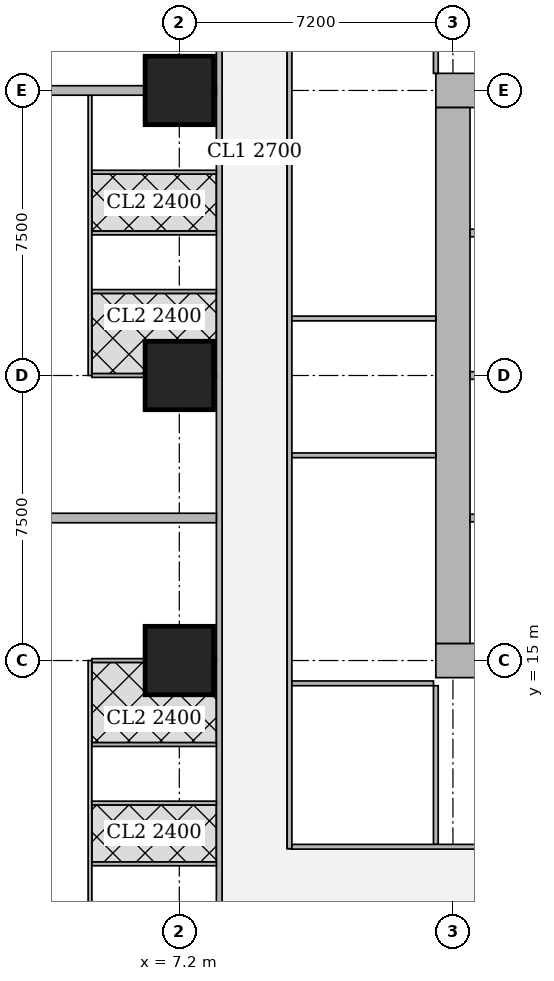
"""IFC4 building model, lengths in metres.
Left out: names, types, materials, properties, quantities, classifications, styles, units other than length and angle.
Written with IfcOpenShell. Run it as: python <this file> out.ifc"""

import sys

from ifc_helpers import new_model, si_unit, direction, frame, frame_2d, origin, origin_2d, place, context, subcontext, project, spatial, rectangle, extrude, element, fill, save


model = new_model("IFC4")
c1 = context("Model", 3, precision=1e-05, world=origin(), true_north=direction((0.0, 1.0)))
c2 = subcontext(c1, "Body", "Model", "MODEL_VIEW")
j1 = project(units=[si_unit("LENGTHUNIT", "METRE"), si_unit("PLANEANGLEUNIT", "RADIAN")], contexts=[c1])
p1 = place(None, origin())
s1 = spatial("IfcSite", under=j1, at=p1, CompositionType="ELEMENT")
p2 = place(p1, origin())
s2 = spatial("IfcBuilding", under=s1, at=p2, CompositionType="ELEMENT")
p3 = place(p2, frame((0.0, 0.0, 31.25)))
s3 = spatial("IfcBuildingStorey", under=s2, at=p3, CompositionType="ELEMENT", Elevation=31.25)
for number, where, z_axis, x_axis in (
    (1, (7.2, 15.0, 0.0), (0.0, 0.0, 1.0), (1.0, 0.0, 0.0)),
    (2, (7.2, 22.5, 0.0), (0.0, 0.0, 1.0), (1.0, 0.0, 0.0)),
    (3, (7.2, 30.0, 0.0), (0.0, 0.0, 1.0), (1.0, 0.0, 0.0)),
):
    element("IfcColumn", number, at=place(p3, frame(where, z_axis=z_axis, x_axis=x_axis)), inside=s3, PredefinedType="COLUMN", context=c2, shape_type="SweptSolid", body=[
        extrude(rectangle(XDim=1.8, YDim=1.8, at=origin_2d()), origin(), (0.0, 0.0, 1.0), 3.75),
    ])
p4 = place(p3, frame((13.95, 15.0, 0.0), z_axis=(0.0, 0.0, 1.0), x_axis=(1.0, 0.0, 0.0)))
e4 = element("IfcWall", 4, at=p4, inside=s3, PredefinedType="SHEAR", context=c2, shape_type="SweptSolid", body=[
    extrude(rectangle(XDim=15.3, YDim=0.9, at=frame_2d((7.65, 0.0))), origin(), (0.0, 0.0, 1.0), 3.75),
])
p5 = place(p4, frame((4.45, 0.0, 0.0)))
e5 = element("IfcOpeningElement", 5, at=p5, cuts=e4, PredefinedType="OPENING", context=c2, shape_type="SweptSolid", body=[
    extrude(rectangle(XDim=1.8, YDim=2.1, at=frame_2d((0.9, 1.05))), frame((0.0, 0.46, 0.0), z_axis=(0.0, -1.0, 0.0), x_axis=(1.0, 0.0, 0.0)), (0.0, 0.0, 1.0), 0.92),
])
p6 = place(p4, frame((10.7, 0.0, 0.0)))
e6 = element("IfcOpeningElement", 6, at=p6, cuts=e4, PredefinedType="OPENING", context=c2, shape_type="SweptSolid", body=[
    extrude(rectangle(XDim=1.1, YDim=2.1, at=frame_2d((0.55, 1.05))), frame((0.0, 0.46, 0.0), z_axis=(0.0, -1.0, 0.0), x_axis=(1.0, 0.0, 0.0)), (0.0, 0.0, 1.0), 0.92),
])
p7 = place(p3, frame((13.95, 30.0, 0.0), z_axis=(0.0, 0.0, 1.0), x_axis=(1.0, 0.0, 0.0)))
e7 = element("IfcWall", 7, at=p7, inside=s3, PredefinedType="SHEAR", context=c2, shape_type="SweptSolid", body=[
    extrude(rectangle(XDim=15.3, YDim=0.9, at=frame_2d((7.65, 0.0))), origin(), (0.0, 0.0, 1.0), 3.75),
])
p8 = place(p7, frame((4.45, 0.0, 0.0)))
e8 = element("IfcOpeningElement", 8, at=p8, cuts=e7, PredefinedType="OPENING", context=c2, shape_type="SweptSolid", body=[
    extrude(rectangle(XDim=1.8, YDim=2.1, at=frame_2d((0.9, 1.05))), frame((0.0, 0.46, 0.0), z_axis=(0.0, -1.0, 0.0), x_axis=(1.0, 0.0, 0.0)), (0.0, 0.0, 1.0), 0.92),
])
p9 = place(p7, frame((10.7, 0.0, 0.0)))
e9 = element("IfcOpeningElement", 9, at=p9, cuts=e7, PredefinedType="OPENING", context=c2, shape_type="SweptSolid", body=[
    extrude(rectangle(XDim=1.1, YDim=2.1, at=frame_2d((0.55, 1.05))), frame((0.0, 0.46, 0.0), z_axis=(0.0, -1.0, 0.0), x_axis=(1.0, 0.0, 0.0)), (0.0, 0.0, 1.0), 0.92),
])
p10 = place(p3, frame((14.4, 15.45, 0.0), z_axis=(0.0, 0.0, 1.0), x_axis=(0.0, 1.0, 0.0)))
e10 = element("IfcWall", 10, at=p10, inside=s3, PredefinedType="SHEAR", context=c2, shape_type="SweptSolid", body=[
    extrude(rectangle(XDim=14.1, YDim=0.9, at=frame_2d((7.05, 0.0))), origin(), (0.0, 0.0, 1.0), 3.75),
])
p11 = place(p3, frame((8.25, 2.426, 0.0), z_axis=(0.0, 0.0, 1.0), x_axis=(0.0, 1.0, 0.0)))
e11 = element("IfcWall", 11, at=p11, inside=s3, PredefinedType="SOLIDWALL", context=c2, shape_type="SweptSolid", body=[
    extrude(rectangle(XDim=40.173, YDim=0.15, at=frame_2d((20.086, 0.0))), origin(), (0.0, 0.0, 1.0), 3.5),
])
p12 = place(p11, frame((14.161, 0.0, 0.0)))
e12 = element("IfcOpeningElement", 12, at=p12, cuts=e11, PredefinedType="OPENING", context=c2, shape_type="SweptSolid", body=[
    extrude(rectangle(XDim=1.0, YDim=2.1, at=frame_2d((0.5, 1.05))), frame((0.0, 0.085, 0.0), z_axis=(0.0, -1.0, 0.0), x_axis=(1.0, 0.0, 0.0)), (0.0, 0.0, 1.0), 0.17),
])
p13 = place(p11, frame((17.487, 0.0, 0.0)))
e13 = element("IfcOpeningElement", 13, at=p13, cuts=e11, PredefinedType="OPENING", context=c2, shape_type="SweptSolid", body=[
    extrude(rectangle(XDim=1.0, YDim=2.1, at=frame_2d((0.5, 1.05))), frame((0.0, 0.085, 0.0), z_axis=(0.0, -1.0, 0.0), x_axis=(1.0, 0.0, 0.0)), (0.0, 0.0, 1.0), 0.17),
])
p14 = place(p11, frame((29.161, 0.0, 0.0)))
e14 = element("IfcOpeningElement", 14, at=p14, cuts=e11, PredefinedType="OPENING", context=c2, shape_type="SweptSolid", body=[
    extrude(rectangle(XDim=1.0, YDim=2.1, at=frame_2d((0.5, 1.05))), frame((0.0, 0.085, 0.0), z_axis=(0.0, -1.0, 0.0), x_axis=(1.0, 0.0, 0.0)), (0.0, 0.0, 1.0), 0.17),
])
p15 = place(p3, frame((4.85, 3.018, 0.0), z_axis=(0.0, 0.0, 1.0), x_axis=(0.0, 1.0, 0.0)))
e15 = element("IfcWall", 15, at=p15, inside=s3, PredefinedType="PARTITIONING", context=c2, shape_type="SweptSolid", body=[
    extrude(rectangle(XDim=11.982, YDim=0.1, at=frame_2d((5.991, 0.0))), origin(), (0.0, 0.0, 1.0), 3.5),
])
p16 = place(p15, frame((10.427, 0.0, 0.0)))
e16 = element("IfcOpeningElement", 16, at=p16, cuts=e15, PredefinedType="OPENING", context=c2, shape_type="SweptSolid", body=[
    extrude(rectangle(XDim=0.9, YDim=2.1, at=frame_2d((0.45, 1.05))), frame((0.0, 0.06, 0.0), z_axis=(0.0, -1.0, 0.0), x_axis=(1.0, 0.0, 0.0)), (0.0, 0.0, 1.0), 0.12),
])
p17 = place(p15, frame((6.982, 0.0, 0.0)))
e17 = element("IfcOpeningElement", 17, at=p17, cuts=e15, PredefinedType="OPENING", context=c2, shape_type="SweptSolid", body=[
    extrude(rectangle(XDim=0.9, YDim=2.1, at=frame_2d((0.45, 1.05))), frame((0.0, 0.06, 0.0), z_axis=(0.0, -1.0, 0.0), x_axis=(1.0, 0.0, 0.0)), (0.0, 0.0, 1.0), 0.12),
])
p18 = place(p15, frame((3.122, 0.0, 0.0)))
e18 = element("IfcOpeningElement", 18, at=p18, cuts=e15, PredefinedType="OPENING", context=c2, shape_type="SweptSolid", body=[
    extrude(rectangle(XDim=0.9, YDim=2.1, at=frame_2d((0.45, 1.05))), frame((0.0, 0.06, 0.0), z_axis=(0.0, -1.0, 0.0), x_axis=(1.0, 0.0, 0.0)), (0.0, 0.0, 1.0), 0.12),
])
p19 = place(p15, frame((8.552, 0.0, 0.0)))
e19 = element("IfcOpeningElement", 19, at=p19, cuts=e15, PredefinedType="OPENING", context=c2, shape_type="SweptSolid", body=[
    extrude(rectangle(XDim=0.9, YDim=2.1, at=frame_2d((0.45, 1.05))), frame((0.0, 0.06, 0.0), z_axis=(0.0, -1.0, 0.0), x_axis=(1.0, 0.0, 0.0)), (0.0, 0.0, 1.0), 0.12),
])
p20 = place(p15, frame((5.107, 0.0, 0.0)))
e20 = element("IfcOpeningElement", 20, at=p20, cuts=e15, PredefinedType="OPENING", context=c2, shape_type="SweptSolid", body=[
    extrude(rectangle(XDim=0.9, YDim=2.1, at=frame_2d((0.45, 1.05))), frame((0.0, 0.06, 0.0), z_axis=(0.0, -1.0, 0.0), x_axis=(1.0, 0.0, 0.0)), (0.0, 0.0, 1.0), 0.12),
])
p21 = place(p15, frame((1.247, 0.0, 0.0)))
e21 = element("IfcOpeningElement", 21, at=p21, cuts=e15, PredefinedType="OPENING", context=c2, shape_type="SweptSolid", body=[
    extrude(rectangle(XDim=0.9, YDim=2.1, at=frame_2d((0.45, 1.05))), frame((0.0, 0.06, 0.0), z_axis=(0.0, -1.0, 0.0), x_axis=(1.0, 0.0, 0.0)), (0.0, 0.0, 1.0), 0.12),
])
p22 = place(p3, frame((4.9, 11.25, 0.0), z_axis=(0.0, 0.0, 1.0), x_axis=(1.0, 0.0, 0.0)))
e22 = element("IfcWall", 22, at=p22, inside=s3, PredefinedType="PARTITIONING", context=c2, shape_type="SweptSolid", body=[
    extrude(rectangle(XDim=3.275, YDim=0.1, at=frame_2d((1.638, 0.0))), origin(), (0.0, 0.0, 1.0), 3.5),
])
p23 = place(p3, frame((4.9, 15.0, 0.0), z_axis=(0.0, 0.0, 1.0), x_axis=(1.0, 0.0, 0.0)))
e23 = element("IfcWall", 23, at=p23, inside=s3, PredefinedType="PARTITIONING", context=c2, shape_type="SweptSolid", body=[
    extrude(rectangle(XDim=1.399, YDim=0.1, at=frame_2d((0.7, 0.0))), origin(), (0.0, 0.0, 1.0), 3.5),
])
p24 = place(p3, frame((8.101, 15.0, 0.0), z_axis=(0.0, 0.0, 1.0), x_axis=(1.0, 0.0, 0.0)))
e24 = element("IfcWall", 24, at=p24, inside=s3, PredefinedType="PARTITIONING", context=c2, shape_type="SweptSolid", body=[
    extrude(rectangle(XDim=0.074, YDim=0.1, at=frame_2d((0.037, 0.0))), origin(), (0.0, 0.0, 1.0), 3.5),
])
for number, where, z_axis, x_axis in (
    (25, (4.9, 12.79, 0.0), (0.0, 0.0, 1.0), (1.0, 0.0, 0.0)),
    (26, (4.9, 9.65, 0.0), (0.0, 0.0, 1.0), (1.0, 0.0, 0.0)),
):
    element("IfcWall", number, at=place(p3, frame(where, z_axis=z_axis, x_axis=x_axis)), inside=s3, PredefinedType="PARTITIONING", context=c2, shape_type="SweptSolid", body=[
        extrude(rectangle(XDim=3.275, YDim=0.1, at=frame_2d((1.638, 0.0))), origin(), (0.0, 0.0, 1.0), 3.5),
    ])
p25 = place(p3, frame((4.85, 22.5, 0.0), z_axis=(0.0, 0.0, 1.0), x_axis=(0.0, 1.0, 0.0)))
e27 = element("IfcWall", 27, at=p25, inside=s3, PredefinedType="PARTITIONING", context=c2, shape_type="SweptSolid", body=[
    extrude(rectangle(XDim=7.375, YDim=0.1, at=frame_2d((3.688, 0.0))), origin(), (0.0, 0.0, 1.0), 3.5),
])
p26 = place(p25, frame((0.655, 0.0, 0.0)))
e28 = element("IfcOpeningElement", 28, at=p26, cuts=e27, PredefinedType="OPENING", context=c2, shape_type="SweptSolid", body=[
    extrude(rectangle(XDim=0.9, YDim=2.1, at=frame_2d((0.45, 1.05))), frame((0.0, 0.06, 0.0), z_axis=(0.0, -1.0, 0.0), x_axis=(1.0, 0.0, 0.0)), (0.0, 0.0, 1.0), 0.12),
])
p27 = place(p25, frame((4.1, 0.0, 0.0)))
e29 = element("IfcOpeningElement", 29, at=p27, cuts=e27, PredefinedType="OPENING", context=c2, shape_type="SweptSolid", body=[
    extrude(rectangle(XDim=0.9, YDim=2.1, at=frame_2d((0.45, 1.05))), frame((0.0, 0.06, 0.0), z_axis=(0.0, -1.0, 0.0), x_axis=(1.0, 0.0, 0.0)), (0.0, 0.0, 1.0), 0.12),
])
p28 = place(p25, frame((2.53, 0.0, 0.0)))
e30 = element("IfcOpeningElement", 30, at=p28, cuts=e27, PredefinedType="OPENING", context=c2, shape_type="SweptSolid", body=[
    extrude(rectangle(XDim=0.9, YDim=2.1, at=frame_2d((0.45, 1.05))), frame((0.0, 0.06, 0.0), z_axis=(0.0, -1.0, 0.0), x_axis=(1.0, 0.0, 0.0)), (0.0, 0.0, 1.0), 0.12),
])
p29 = place(p25, frame((5.975, 0.0, 0.0)))
e31 = element("IfcOpeningElement", 31, at=p29, cuts=e27, PredefinedType="OPENING", context=c2, shape_type="SweptSolid", body=[
    extrude(rectangle(XDim=0.9, YDim=2.1, at=frame_2d((0.45, 1.05))), frame((0.0, 0.06, 0.0), z_axis=(0.0, -1.0, 0.0), x_axis=(1.0, 0.0, 0.0)), (0.0, 0.0, 1.0), 0.12),
])
p30 = place(p3, frame((4.9, 22.5, 0.0), z_axis=(0.0, 0.0, 1.0), x_axis=(1.0, 0.0, 0.0)))
e32 = element("IfcWall", 32, at=p30, inside=s3, PredefinedType="PARTITIONING", context=c2, shape_type="SweptSolid", body=[
    extrude(rectangle(XDim=1.399, YDim=0.1, at=frame_2d((0.7, 0.0))), origin(), (0.0, 0.0, 1.0), 3.5),
])
p31 = place(p3, frame((8.101, 22.5, 0.0), z_axis=(0.0, 0.0, 1.0), x_axis=(1.0, 0.0, 0.0)))
e33 = element("IfcWall", 33, at=p31, inside=s3, PredefinedType="PARTITIONING", context=c2, shape_type="SweptSolid", body=[
    extrude(rectangle(XDim=0.074, YDim=0.1, at=frame_2d((0.037, 0.0))), origin(), (0.0, 0.0, 1.0), 3.5),
])
for number, where, z_axis, x_axis in (
    (34, (4.9, 26.25, 0.0), (0.0, 0.0, 1.0), (1.0, 0.0, 0.0)),
    (35, (4.9, 24.71, 0.0), (0.0, 0.0, 1.0), (1.0, 0.0, 0.0)),
    (36, (4.9, 27.85, 0.0), (0.0, 0.0, 1.0), (1.0, 0.0, 0.0)),
):
    element("IfcWall", number, at=place(p3, frame(where, z_axis=z_axis, x_axis=x_axis)), inside=s3, PredefinedType="PARTITIONING", context=c2, shape_type="SweptSolid", body=[
        extrude(rectangle(XDim=3.275, YDim=0.1, at=frame_2d((1.638, 0.0))), origin(), (0.0, 0.0, 1.0), 3.5),
    ])
p32 = place(p3, frame((3.65, 18.75, 0.0), z_axis=(0.0, 0.0, 1.0), x_axis=(1.0, 0.0, 0.0)))
e37 = element("IfcWall", 37, at=p32, inside=s3, PredefinedType="SOLIDWALL", context=c2, shape_type="SweptSolid", body=[
    extrude(rectangle(XDim=4.525, YDim=0.25, at=frame_2d((2.263, 0.0))), origin(), (0.0, 0.0, 1.0), 3.5),
])
p33 = place(p3, frame((3.65, 30.0, 0.0), z_axis=(0.0, 0.0, 1.0), x_axis=(1.0, 0.0, 0.0)))
e38 = element("IfcWall", 38, at=p33, inside=s3, PredefinedType="SOLIDWALL", context=c2, shape_type="SweptSolid", body=[
    extrude(rectangle(XDim=2.649, YDim=0.25, at=frame_2d((1.325, 0.0))), origin(), (0.0, 0.0, 1.0), 3.5),
])
p34 = place(p3, frame((8.101, 30.0, 0.0), z_axis=(0.0, 0.0, 1.0), x_axis=(1.0, 0.0, 0.0)))
e39 = element("IfcWall", 39, at=p34, inside=s3, PredefinedType="SOLIDWALL", context=c2, shape_type="SweptSolid", body=[
    extrude(rectangle(XDim=0.074, YDim=0.25, at=frame_2d((0.037, 0.0))), origin(), (0.0, 0.0, 1.0), 3.5),
])
p35 = place(p3, frame((10.1, 10.05, 0.0), z_axis=(0.0, 0.0, 1.0), x_axis=(0.0, 1.0, 0.0)))
e40 = element("IfcWall", 40, at=p35, inside=s3, PredefinedType="PARTITIONING", context=c2, shape_type="SweptSolid", body=[
    extrude(rectangle(XDim=24.9, YDim=0.125, at=frame_2d((12.45, 0.0))), origin(), (0.0, 0.0, 1.0), 3.5),
])
p36 = place(p35, frame((1.675, 0.0, 0.0)))
e41 = element("IfcOpeningElement", 41, at=p36, cuts=e40, PredefinedType="OPENING", context=c2, shape_type="SweptSolid", body=[
    extrude(rectangle(XDim=1.0, YDim=2.1, at=frame_2d((0.5, 1.05))), frame((0.0, 0.073, 0.0), z_axis=(0.0, -1.0, 0.0), x_axis=(1.0, 0.0, 0.0)), (0.0, 0.0, 1.0), 0.145),
])
p37 = place(p35, frame((6.85, 0.0, 0.0)))
e42 = element("IfcOpeningElement", 42, at=p37, cuts=e40, PredefinedType="OPENING", context=c2, shape_type="SweptSolid", body=[
    extrude(rectangle(XDim=1.0, YDim=2.1, at=frame_2d((0.5, 1.05))), frame((0.0, 0.073, 0.0), z_axis=(0.0, -1.0, 0.0), x_axis=(1.0, 0.0, 0.0)), (0.0, 0.0, 1.0), 0.145),
])
p38 = place(p35, frame((11.65, 0.0, 0.0)))
e43 = element("IfcOpeningElement", 43, at=p38, cuts=e40, PredefinedType="OPENING", context=c2, shape_type="SweptSolid", body=[
    extrude(rectangle(XDim=1.0, YDim=2.1, at=frame_2d((0.5, 1.05))), frame((0.0, 0.073, 0.0), z_axis=(0.0, -1.0, 0.0), x_axis=(1.0, 0.0, 0.0)), (0.0, 0.0, 1.0), 0.145),
])
p39 = place(p35, frame((18.925, 0.0, 0.0)))
e44 = element("IfcOpeningElement", 44, at=p39, cuts=e40, PredefinedType="OPENING", context=c2, shape_type="SweptSolid", body=[
    extrude(rectangle(XDim=1.0, YDim=2.1, at=frame_2d((0.5, 1.05))), frame((0.0, 0.073, 0.0), z_axis=(0.0, -1.0, 0.0), x_axis=(1.0, 0.0, 0.0)), (0.0, 0.0, 1.0), 0.145),
])
p40 = place(p3, frame((10.163, 14.4, 0.0), z_axis=(0.0, 0.0, 1.0), x_axis=(1.0, 0.0, 0.0)))
e45 = element("IfcWall", 45, at=p40, inside=s3, PredefinedType="PARTITIONING", context=c2, shape_type="SweptSolid", body=[
    extrude(rectangle(XDim=3.725, YDim=0.125, at=frame_2d((1.862, 0.0))), origin(), (0.0, 0.0, 1.0), 3.5),
])
for number, where, z_axis, x_axis in (
    (46, (10.163, 20.4, 0.0), (0.0, 0.0, 1.0), (1.0, 0.0, 0.0)),
    (47, (10.163, 24.0, 0.0), (0.0, 0.0, 1.0), (1.0, 0.0, 0.0)),
):
    element("IfcWall", number, at=place(p3, frame(where, z_axis=z_axis, x_axis=x_axis)), inside=s3, PredefinedType="PARTITIONING", context=c2, shape_type="SweptSolid", body=[
        extrude(rectangle(XDim=3.787, YDim=0.125, at=frame_2d((1.894, 0.0))), origin(), (0.0, 0.0, 1.0), 3.5),
    ])
p41 = place(p3, frame((13.95, 10.163, 0.0), z_axis=(0.0, 0.0, 1.0), x_axis=(0.0, 1.0, 0.0)))
e48 = element("IfcWall", 48, at=p41, inside=s3, PredefinedType="PARTITIONING", context=c2, shape_type="SweptSolid", body=[
    extrude(rectangle(XDim=4.175, YDim=0.125, at=frame_2d((2.087, 0.0))), origin(), (0.0, 0.0, 1.0), 3.5),
])
p42 = place(p3, frame((13.95, 30.45, 0.0), z_axis=(0.0, 0.0, 1.0), x_axis=(0.0, 1.0, 0.0)))
e49 = element("IfcWall", 49, at=p42, inside=s3, PredefinedType="PARTITIONING", context=c2, shape_type="SweptSolid", body=[
    extrude(rectangle(XDim=4.387, YDim=0.125, at=frame_2d((2.193, 0.0))), origin(), (0.0, 0.0, 1.0), 3.5),
])
p43 = place(p3, frame((10.163, 10.1, 0.0), z_axis=(0.0, 0.0, 1.0), x_axis=(1.0, 0.0, 0.0)))
e50 = element("IfcWall", 50, at=p43, inside=s3, PredefinedType="PARTITIONING", context=c2, shape_type="SweptSolid", body=[
    extrude(rectangle(XDim=11.287, YDim=0.125, at=frame_2d((5.644, 0.0))), origin(), (0.0, 0.0, 1.0), 3.5),
])
p44 = place(p43, frame((7.832, 0.0, 0.0)))
e51 = element("IfcOpeningElement", 51, at=p44, cuts=e50, PredefinedType="OPENING", context=c2, shape_type="SweptSolid", body=[
    extrude(rectangle(XDim=1.8, YDim=2.1, at=frame_2d((0.9, 1.05))), frame((0.0, 0.073, 0.0), z_axis=(0.0, -1.0, 0.0), x_axis=(1.0, 0.0, 0.0)), (0.0, 0.0, 1.0), 0.145),
])
for number, where, z_axis, x_axis in (
    (52, (14.85, 18.75, 0.0), (0.0, 0.0, 1.0), (1.0, 0.0, 0.0)),
    (53, (14.85, 22.5, 0.0), (0.0, 0.0, 1.0), (1.0, 0.0, 0.0)),
    (54, (14.85, 26.25, 0.0), (0.0, 0.0, 1.0), (1.0, 0.0, 0.0)),
):
    element("IfcWall", number, at=place(p3, frame(where, z_axis=z_axis, x_axis=x_axis)), inside=s3, PredefinedType="SOLIDWALL", context=c2, shape_type="SweptSolid", body=[
        extrude(rectangle(XDim=1.95, YDim=0.2, at=frame_2d((0.975, 0.0))), origin(), (0.0, 0.0, 1.0), 3.5),
    ])
p45 = place(p16, origin())
e55 = element("IfcDoor", 55, at=p45, inside=s3, OperationType="SINGLE_SWING_LEFT", PredefinedType="DOOR", context=c2, shape_type="SweptSolid", body=[
    extrude(rectangle(XDim=0.9, YDim=2.1, at=frame_2d((0.45, 1.05))), frame((0.0, 0.025, 0.0), z_axis=(0.0, -1.0, 0.0), x_axis=(1.0, 0.0, 0.0)), (0.0, 0.0, 1.0), 0.05),
])
fill(e16, e55)
p46 = place(p17, origin())
e56 = element("IfcDoor", 56, at=p46, inside=s3, OperationType="SINGLE_SWING_LEFT", PredefinedType="DOOR", context=c2, shape_type="SweptSolid", body=[
    extrude(rectangle(XDim=0.9, YDim=2.1, at=frame_2d((0.45, 1.05))), frame((0.0, 0.025, 0.0), z_axis=(0.0, -1.0, 0.0), x_axis=(1.0, 0.0, 0.0)), (0.0, 0.0, 1.0), 0.05),
])
fill(e17, e56)
p47 = place(p19, origin())
e57 = element("IfcDoor", 57, at=p47, inside=s3, OperationType="SINGLE_SWING_RIGHT", PredefinedType="DOOR", context=c2, shape_type="SweptSolid", body=[
    extrude(rectangle(XDim=0.9, YDim=2.1, at=frame_2d((0.45, 1.05))), frame((0.0, 0.025, 0.0), z_axis=(0.0, -1.0, 0.0), x_axis=(1.0, 0.0, 0.0)), (0.0, 0.0, 1.0), 0.05),
])
fill(e19, e57)
p48 = place(p20, origin())
e58 = element("IfcDoor", 58, at=p48, inside=s3, OperationType="SINGLE_SWING_RIGHT", PredefinedType="DOOR", context=c2, shape_type="SweptSolid", body=[
    extrude(rectangle(XDim=0.9, YDim=2.1, at=frame_2d((0.45, 1.05))), frame((0.0, 0.025, 0.0), z_axis=(0.0, -1.0, 0.0), x_axis=(1.0, 0.0, 0.0)), (0.0, 0.0, 1.0), 0.05),
])
fill(e20, e58)
p49 = place(p12, origin())
e59 = element("IfcDoor", 59, at=p49, inside=s3, OperationType="SINGLE_SWING_RIGHT", PredefinedType="DOOR", context=c2, shape_type="SweptSolid", body=[
    extrude(rectangle(XDim=1.0, YDim=2.1, at=frame_2d((0.5, 1.05))), frame((0.0, 0.025, 0.0), z_axis=(0.0, -1.0, 0.0), x_axis=(1.0, 0.0, 0.0)), (0.0, 0.0, 1.0), 0.05),
])
fill(e12, e59)
p50 = place(p26, origin())
e60 = element("IfcDoor", 60, at=p50, inside=s3, OperationType="SINGLE_SWING_RIGHT", PredefinedType="DOOR", context=c2, shape_type="SweptSolid", body=[
    extrude(rectangle(XDim=0.9, YDim=2.1, at=frame_2d((0.45, 1.05))), frame((0.0, 0.025, 0.0), z_axis=(0.0, -1.0, 0.0), x_axis=(1.0, 0.0, 0.0)), (0.0, 0.0, 1.0), 0.05),
])
fill(e28, e60)
p51 = place(p27, origin())
e61 = element("IfcDoor", 61, at=p51, inside=s3, OperationType="SINGLE_SWING_LEFT", PredefinedType="DOOR", context=c2, shape_type="SweptSolid", body=[
    extrude(rectangle(XDim=0.9, YDim=2.1, at=frame_2d((0.45, 1.05))), frame((0.0, 0.025, 0.0), z_axis=(0.0, -1.0, 0.0), x_axis=(1.0, 0.0, 0.0)), (0.0, 0.0, 1.0), 0.05),
])
fill(e29, e61)
p52 = place(p28, origin())
e62 = element("IfcDoor", 62, at=p52, inside=s3, OperationType="SINGLE_SWING_LEFT", PredefinedType="DOOR", context=c2, shape_type="SweptSolid", body=[
    extrude(rectangle(XDim=0.9, YDim=2.1, at=frame_2d((0.45, 1.05))), frame((0.0, 0.025, 0.0), z_axis=(0.0, -1.0, 0.0), x_axis=(1.0, 0.0, 0.0)), (0.0, 0.0, 1.0), 0.05),
])
fill(e30, e62)
p53 = place(p29, origin())
e63 = element("IfcDoor", 63, at=p53, inside=s3, OperationType="SINGLE_SWING_LEFT", PredefinedType="DOOR", context=c2, shape_type="SweptSolid", body=[
    extrude(rectangle(XDim=0.9, YDim=2.1, at=frame_2d((0.45, 1.05))), frame((0.0, 0.025, 0.0), z_axis=(0.0, -1.0, 0.0), x_axis=(1.0, 0.0, 0.0)), (0.0, 0.0, 1.0), 0.05),
])
fill(e31, e63)
p54 = place(p13, origin())
e64 = element("IfcDoor", 64, at=p54, inside=s3, OperationType="SINGLE_SWING_LEFT", PredefinedType="DOOR", context=c2, shape_type="SweptSolid", body=[
    extrude(rectangle(XDim=1.0, YDim=2.1, at=frame_2d((0.5, 1.05))), frame((0.0, 0.025, 0.0), z_axis=(0.0, -1.0, 0.0), x_axis=(1.0, 0.0, 0.0)), (0.0, 0.0, 1.0), 0.05),
])
fill(e13, e64)
p55 = place(p36, origin())
e65 = element("IfcDoor", 65, at=p55, inside=s3, OperationType="SINGLE_SWING_RIGHT", PredefinedType="DOOR", context=c2, shape_type="SweptSolid", body=[
    extrude(rectangle(XDim=1.0, YDim=2.1, at=frame_2d((0.5, 1.05))), frame((0.0, 0.025, 0.0), z_axis=(0.0, -1.0, 0.0), x_axis=(1.0, 0.0, 0.0)), (0.0, 0.0, 1.0), 0.05),
])
fill(e41, e65)
p56 = place(p37, origin())
e66 = element("IfcDoor", 66, at=p56, inside=s3, OperationType="SINGLE_SWING_LEFT", PredefinedType="DOOR", context=c2, shape_type="SweptSolid", body=[
    extrude(rectangle(XDim=1.0, YDim=2.1, at=frame_2d((0.5, 1.05))), frame((0.0, 0.025, 0.0), z_axis=(0.0, -1.0, 0.0), x_axis=(1.0, 0.0, 0.0)), (0.0, 0.0, 1.0), 0.05),
])
fill(e42, e66)
p57 = place(p38, origin())
e67 = element("IfcDoor", 67, at=p57, inside=s3, OperationType="SINGLE_SWING_LEFT", PredefinedType="DOOR", context=c2, shape_type="SweptSolid", body=[
    extrude(rectangle(XDim=1.0, YDim=2.1, at=frame_2d((0.5, 1.05))), frame((0.0, 0.025, 0.0), z_axis=(0.0, -1.0, 0.0), x_axis=(1.0, 0.0, 0.0)), (0.0, 0.0, 1.0), 0.05),
])
fill(e43, e67)
p58 = place(p39, origin())
e68 = element("IfcDoor", 68, at=p58, inside=s3, OperationType="SINGLE_SWING_LEFT", PredefinedType="DOOR", context=c2, shape_type="SweptSolid", body=[
    extrude(rectangle(XDim=1.0, YDim=2.1, at=frame_2d((0.5, 1.05))), frame((0.0, 0.025, 0.0), z_axis=(0.0, -1.0, 0.0), x_axis=(1.0, 0.0, 0.0)), (0.0, 0.0, 1.0), 0.05),
])
fill(e44, e68)
save(model, sys.argv[1])
